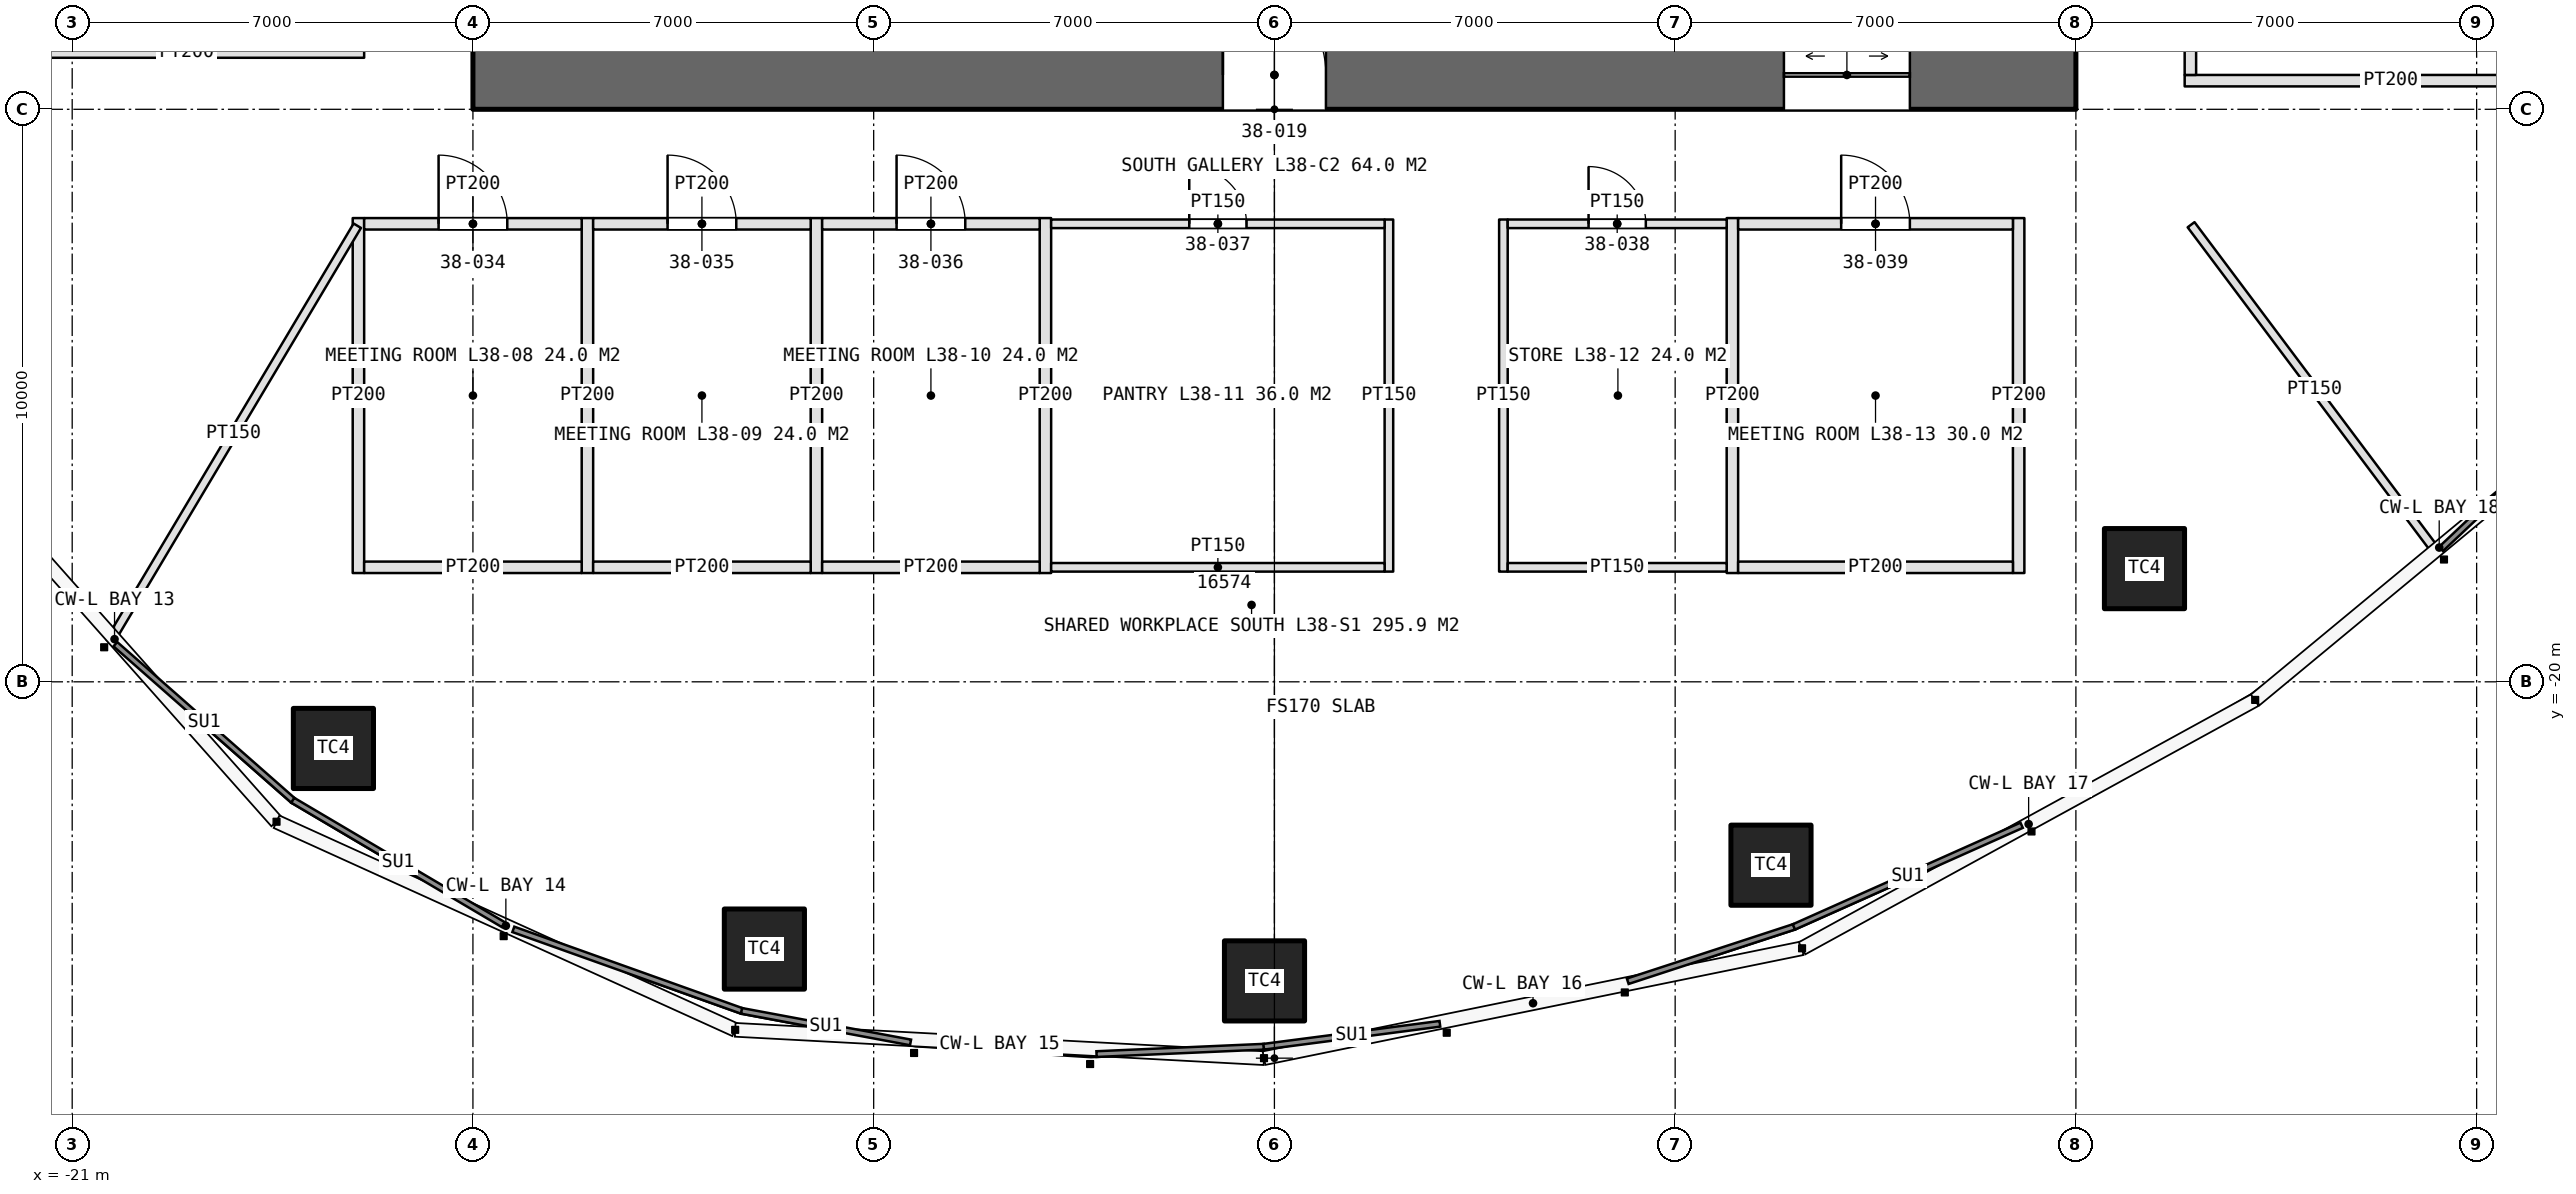
"""IFC4 building model, lengths in metres.
Left out: names, types, materials, properties, quantities, classifications, styles, units other than length and angle.
Written with IfcOpenShell. Run it as: python <this file> out.ifc"""

import sys

from ifc_helpers import new_model, si_unit, direction, frame, frame_2d, origin, origin_2d, place, context, subcontext, project, spatial, rectangle, extrude, element, fill, save


model = new_model("IFC4")
c1 = context("Model", 3, precision=1e-05, world=origin(), true_north=direction((0.0, 1.0)))
c2 = subcontext(c1, "Body", "Model", "MODEL_VIEW")
j1 = project(units=[si_unit("LENGTHUNIT", "METRE"), si_unit("PLANEANGLEUNIT", "RADIAN")], contexts=[c1])
p1 = place(None, origin())
s1 = spatial("IfcSite", under=j1, at=p1, CompositionType="ELEMENT")
p2 = place(p1, origin())
s2 = spatial("IfcBuilding", under=s1, at=p2, CompositionType="ELEMENT")
p3 = place(p2, frame((0.0, 0.0, 176.4)))
s3 = spatial("IfcBuildingStorey", under=s2, at=p3, CompositionType="ELEMENT", Elevation=176.4)
p4 = place(p3, frame((-14.0, -9.4, 0.0), z_axis=(0.0, 0.0, 1.0), x_axis=(1.0, 0.0, 0.0)))
e1 = element("IfcWall", 1, at=p4, inside=s3, PredefinedType="SHEAR", context=c2, shape_type="SweptSolid", body=[
    extrude(rectangle(XDim=28.0, YDim=1.2, at=frame_2d((14.0, 0.0))), origin(), (0.0, 0.0, 1.0), 4.2),
])
p5 = place(p4, frame((13.1, 0.0, 0.0)))
e2 = element("IfcOpeningElement", 2, at=p5, cuts=e1, PredefinedType="OPENING", context=c2, shape_type="SweptSolid", body=[
    extrude(rectangle(XDim=1.8, YDim=2.4, at=frame_2d((0.9, 1.2))), frame((0.0, 0.61, 0.0), z_axis=(0.0, -1.0, 0.0), x_axis=(1.0, 0.0, 0.0)), (0.0, 0.0, 1.0), 1.22),
])
p6 = place(p4, frame((22.9, 0.0, 0.0)))
e3 = element("IfcOpeningElement", 3, at=p6, cuts=e1, PredefinedType="OPENING", context=c2, shape_type="SweptSolid", body=[
    extrude(rectangle(XDim=2.2, YDim=2.7, at=frame_2d((1.1, 1.35))), frame((0.0, 0.61, 0.0), z_axis=(0.0, -1.0, 0.0), x_axis=(1.0, 0.0, 0.0)), (0.0, 0.0, 1.0), 1.22),
])
for number, where, z_axis, x_axis in (
    (4, (-16.437, -21.164, 0.0), (0.0, 0.0, 1.0), (1.0, 0.0, 0.0)),
    (5, (-8.909, -24.668, 0.0), (0.0, 0.0, 1.0), (1.0, 0.0, 0.0)),
    (6, (-0.173, -25.224, 0.0), (0.0, 0.0, 1.0), (1.0, 0.0, 0.0)),
    (7, (8.674, -23.203, 0.0), (0.0, 0.0, 1.0), (1.0, 0.0, 0.0)),
    (8, (15.198, -18.023, 0.0), (0.0, 0.0, 1.0), (1.0, 0.0, 0.0)),
):
    element("IfcColumn", number, at=place(p3, frame(where, z_axis=z_axis, x_axis=x_axis)), inside=s3, PredefinedType="COLUMN", context=c2, shape_type="SweptSolid", body=[
        extrude(rectangle(XDim=1.4, YDim=1.4, at=origin_2d()), origin(), (0.0, 0.0, 1.0), 4.2),
    ])
p7 = place(p3, frame((15.9, -9.5, 0.0), z_axis=(0.0, 0.0, 1.0), x_axis=(1.0, 0.0, 0.0)))
e9 = element("IfcWall", 9, at=p7, inside=s3, PredefinedType="PARTITIONING", context=c2, shape_type="SweptSolid", body=[
    extrude(rectangle(XDim=7.2, YDim=0.2, at=frame_2d((3.6, 0.0))), origin(), (0.0, 0.0, 1.0), 3.0),
])
p8 = place(p3, frame((16.0, -9.4, 0.0), z_axis=(0.0, 0.0, 1.0), x_axis=(0.0, 1.0, 0.0)))
e10 = element("IfcWall", 10, at=p8, inside=s3, PredefinedType="PARTITIONING", context=c2, shape_type="SweptSolid", body=[
    extrude(rectangle(XDim=5.8, YDim=0.2, at=frame_2d((2.9, 0.0))), origin(), (0.0, 0.0, 1.0), 3.0),
])
p9 = place(p8, frame((2.3, 0.0, 0.0)))
e11 = element("IfcOpeningElement", 11, at=p9, cuts=e10, PredefinedType="OPENING", context=c2, shape_type="SweptSolid", body=[
    extrude(rectangle(XDim=1.2, YDim=2.4, at=frame_2d((0.6, 1.2))), frame((0.0, 0.11, 0.0), z_axis=(0.0, -1.0, 0.0), x_axis=(1.0, 0.0, 0.0)), (0.0, 0.0, 1.0), 0.22),
])
for number, where, z_axis, x_axis in (
    (12, (-16.0, -11.9, 0.0), (0.0, 0.0, 1.0), (0.0, -1.0, 0.0)),
    (13, (-12.0, -11.9, 0.0), (0.0, 0.0, 1.0), (0.0, -1.0, 0.0)),
    (14, (-8.0, -11.9, 0.0), (0.0, 0.0, 1.0), (0.0, -1.0, 0.0)),
    (15, (-4.0, -11.9, 0.0), (0.0, 0.0, 1.0), (0.0, -1.0, 0.0)),
):
    element("IfcWall", number, at=place(p3, frame(where, z_axis=z_axis, x_axis=x_axis)), inside=s3, PredefinedType="PARTITIONING", context=c2, shape_type="SweptSolid", body=[
        extrude(rectangle(XDim=6.2, YDim=0.2, at=frame_2d((3.1, 0.0))), origin(), (0.0, 0.0, 1.0), 3.0),
    ])
p10 = place(p3, frame((2.0, -11.925, 0.0), z_axis=(0.0, 0.0, 1.0), x_axis=(0.0, -1.0, 0.0)))
e16 = element("IfcWall", 16, at=p10, inside=s3, PredefinedType="PARTITIONING", context=c2, shape_type="SweptSolid", body=[
    extrude(rectangle(XDim=6.15, YDim=0.15, at=frame_2d((3.075, 0.0))), origin(), (0.0, 0.0, 1.0), 3.0),
])
p11 = place(p3, frame((-15.9, -12.0, 0.0), z_axis=(0.0, 0.0, 1.0), x_axis=(1.0, 0.0, 0.0)))
e17 = element("IfcWall", 17, at=p11, inside=s3, PredefinedType="PARTITIONING", context=c2, shape_type="SweptSolid", body=[
    extrude(rectangle(XDim=3.8, YDim=0.2, at=frame_2d((1.9, 0.0))), origin(), (0.0, 0.0, 1.0), 3.0),
])
p12 = place(p11, frame((1.3, 0.0, 0.0)))
e18 = element("IfcOpeningElement", 18, at=p12, cuts=e17, PredefinedType="OPENING", context=c2, shape_type="SweptSolid", body=[
    extrude(rectangle(XDim=1.2, YDim=2.4, at=frame_2d((0.6, 1.2))), frame((0.0, 0.11, 0.0), z_axis=(0.0, -1.0, 0.0), x_axis=(1.0, 0.0, 0.0)), (0.0, 0.0, 1.0), 0.22),
])
p13 = place(p3, frame((-15.9, -18.0, 0.0), z_axis=(0.0, 0.0, 1.0), x_axis=(1.0, 0.0, 0.0)))
e19 = element("IfcWall", 19, at=p13, inside=s3, PredefinedType="PARTITIONING", context=c2, shape_type="SweptSolid", body=[
    extrude(rectangle(XDim=3.8, YDim=0.2, at=frame_2d((1.9, 0.0))), origin(), (0.0, 0.0, 1.0), 3.0),
])
p14 = place(p3, frame((-11.9, -12.0, 0.0), z_axis=(0.0, 0.0, 1.0), x_axis=(1.0, 0.0, 0.0)))
e20 = element("IfcWall", 20, at=p14, inside=s3, PredefinedType="PARTITIONING", context=c2, shape_type="SweptSolid", body=[
    extrude(rectangle(XDim=3.8, YDim=0.2, at=frame_2d((1.9, 0.0))), origin(), (0.0, 0.0, 1.0), 3.0),
])
p15 = place(p14, frame((1.3, 0.0, 0.0)))
e21 = element("IfcOpeningElement", 21, at=p15, cuts=e20, PredefinedType="OPENING", context=c2, shape_type="SweptSolid", body=[
    extrude(rectangle(XDim=1.2, YDim=2.4, at=frame_2d((0.6, 1.2))), frame((0.0, 0.11, 0.0), z_axis=(0.0, -1.0, 0.0), x_axis=(1.0, 0.0, 0.0)), (0.0, 0.0, 1.0), 0.22),
])
p16 = place(p3, frame((-11.9, -18.0, 0.0), z_axis=(0.0, 0.0, 1.0), x_axis=(1.0, 0.0, 0.0)))
e22 = element("IfcWall", 22, at=p16, inside=s3, PredefinedType="PARTITIONING", context=c2, shape_type="SweptSolid", body=[
    extrude(rectangle(XDim=3.8, YDim=0.2, at=frame_2d((1.9, 0.0))), origin(), (0.0, 0.0, 1.0), 3.0),
])
p17 = place(p3, frame((-7.9, -12.0, 0.0), z_axis=(0.0, 0.0, 1.0), x_axis=(1.0, 0.0, 0.0)))
e23 = element("IfcWall", 23, at=p17, inside=s3, PredefinedType="PARTITIONING", context=c2, shape_type="SweptSolid", body=[
    extrude(rectangle(XDim=3.8, YDim=0.2, at=frame_2d((1.9, 0.0))), origin(), (0.0, 0.0, 1.0), 3.0),
])
p18 = place(p17, frame((1.3, 0.0, 0.0)))
e24 = element("IfcOpeningElement", 24, at=p18, cuts=e23, PredefinedType="OPENING", context=c2, shape_type="SweptSolid", body=[
    extrude(rectangle(XDim=1.2, YDim=2.4, at=frame_2d((0.6, 1.2))), frame((0.0, 0.11, 0.0), z_axis=(0.0, -1.0, 0.0), x_axis=(1.0, 0.0, 0.0)), (0.0, 0.0, 1.0), 0.22),
])
p19 = place(p3, frame((-7.9, -18.0, 0.0), z_axis=(0.0, 0.0, 1.0), x_axis=(1.0, 0.0, 0.0)))
e25 = element("IfcWall", 25, at=p19, inside=s3, PredefinedType="PARTITIONING", context=c2, shape_type="SweptSolid", body=[
    extrude(rectangle(XDim=3.8, YDim=0.2, at=frame_2d((1.9, 0.0))), origin(), (0.0, 0.0, 1.0), 3.0),
])
p20 = place(p3, frame((-3.9, -12.0, 0.0), z_axis=(0.0, 0.0, 1.0), x_axis=(1.0, 0.0, 0.0)))
e26 = element("IfcWall", 26, at=p20, inside=s3, PredefinedType="PARTITIONING", context=c2, shape_type="SweptSolid", body=[
    extrude(rectangle(XDim=5.825, YDim=0.15, at=frame_2d((2.913, 0.0))), origin(), (0.0, 0.0, 1.0), 3.0),
])
p21 = place(p20, frame((2.413, 0.0, 0.0)))
e27 = element("IfcOpeningElement", 27, at=p21, cuts=e26, PredefinedType="OPENING", context=c2, shape_type="SweptSolid", body=[
    extrude(rectangle(XDim=1.0, YDim=2.2, at=frame_2d((0.5, 1.1))), frame((0.0, 0.085, 0.0), z_axis=(0.0, -1.0, 0.0), x_axis=(1.0, 0.0, 0.0)), (0.0, 0.0, 1.0), 0.17),
])
p22 = place(p3, frame((-3.9, -18.0, 0.0), z_axis=(0.0, 0.0, 1.0), x_axis=(1.0, 0.0, 0.0)))
e28 = element("IfcWall", 28, at=p22, inside=s3, PredefinedType="PARTITIONING", context=c2, shape_type="SweptSolid", body=[
    extrude(rectangle(XDim=5.825, YDim=0.15, at=frame_2d((2.913, 0.0))), origin(), (0.0, 0.0, 1.0), 3.0),
])
p23 = place(p3, frame((4.0, -11.925, 0.0), z_axis=(0.0, 0.0, 1.0), x_axis=(0.0, -1.0, 0.0)))
e29 = element("IfcWall", 29, at=p23, inside=s3, PredefinedType="PARTITIONING", context=c2, shape_type="SweptSolid", body=[
    extrude(rectangle(XDim=6.15, YDim=0.15, at=frame_2d((3.075, 0.0))), origin(), (0.0, 0.0, 1.0), 3.0),
])
for number, where, z_axis, x_axis in (
    (30, (8.0, -11.9, 0.0), (0.0, 0.0, 1.0), (0.0, -1.0, 0.0)),
    (31, (13.0, -11.9, 0.0), (0.0, 0.0, 1.0), (0.0, -1.0, 0.0)),
):
    element("IfcWall", number, at=place(p3, frame(where, z_axis=z_axis, x_axis=x_axis)), inside=s3, PredefinedType="PARTITIONING", context=c2, shape_type="SweptSolid", body=[
        extrude(rectangle(XDim=6.2, YDim=0.2, at=frame_2d((3.1, 0.0))), origin(), (0.0, 0.0, 1.0), 3.0),
    ])
p24 = place(p3, frame((4.075, -12.0, 0.0), z_axis=(0.0, 0.0, 1.0), x_axis=(1.0, 0.0, 0.0)))
e32 = element("IfcWall", 32, at=p24, inside=s3, PredefinedType="PARTITIONING", context=c2, shape_type="SweptSolid", body=[
    extrude(rectangle(XDim=3.825, YDim=0.15, at=frame_2d((1.913, 0.0))), origin(), (0.0, 0.0, 1.0), 3.0),
])
p25 = place(p24, frame((1.413, 0.0, 0.0)))
e33 = element("IfcOpeningElement", 33, at=p25, cuts=e32, PredefinedType="OPENING", context=c2, shape_type="SweptSolid", body=[
    extrude(rectangle(XDim=1.0, YDim=2.2, at=frame_2d((0.5, 1.1))), frame((0.0, 0.085, 0.0), z_axis=(0.0, -1.0, 0.0), x_axis=(1.0, 0.0, 0.0)), (0.0, 0.0, 1.0), 0.17),
])
p26 = place(p3, frame((4.075, -18.0, 0.0), z_axis=(0.0, 0.0, 1.0), x_axis=(1.0, 0.0, 0.0)))
e34 = element("IfcWall", 34, at=p26, inside=s3, PredefinedType="PARTITIONING", context=c2, shape_type="SweptSolid", body=[
    extrude(rectangle(XDim=3.825, YDim=0.15, at=frame_2d((1.913, 0.0))), origin(), (0.0, 0.0, 1.0), 3.0),
])
p27 = place(p3, frame((8.1, -12.0, 0.0), z_axis=(0.0, 0.0, 1.0), x_axis=(1.0, 0.0, 0.0)))
e35 = element("IfcWall", 35, at=p27, inside=s3, PredefinedType="PARTITIONING", context=c2, shape_type="SweptSolid", body=[
    extrude(rectangle(XDim=4.8, YDim=0.2, at=frame_2d((2.4, 0.0))), origin(), (0.0, 0.0, 1.0), 3.0),
])
p28 = place(p27, frame((1.8, 0.0, 0.0)))
e36 = element("IfcOpeningElement", 36, at=p28, cuts=e35, PredefinedType="OPENING", context=c2, shape_type="SweptSolid", body=[
    extrude(rectangle(XDim=1.2, YDim=2.4, at=frame_2d((0.6, 1.2))), frame((0.0, 0.11, 0.0), z_axis=(0.0, -1.0, 0.0), x_axis=(1.0, 0.0, 0.0)), (0.0, 0.0, 1.0), 0.22),
])
p29 = place(p3, frame((8.1, -18.0, 0.0), z_axis=(0.0, 0.0, 1.0), x_axis=(1.0, 0.0, 0.0)))
e37 = element("IfcWall", 37, at=p29, inside=s3, PredefinedType="PARTITIONING", context=c2, shape_type="SweptSolid", body=[
    extrude(rectangle(XDim=4.8, YDim=0.2, at=frame_2d((2.4, 0.0))), origin(), (0.0, 0.0, 1.0), 3.0),
])
p30 = place(p3, frame((-15.9, -9.0, 0.0), z_axis=(0.0, 0.0, 1.0), x_axis=(-1.0, 0.0, 0.0)))
e38 = element("IfcWall", 38, at=p30, inside=s3, PredefinedType="PARTITIONING", context=c2, shape_type="SweptSolid", body=[
    extrude(rectangle(XDim=6.2, YDim=0.2, at=frame_2d((3.1, 0.0))), origin(), (0.0, 0.0, 1.0), 3.0),
])
p31 = place(p3, frame((-16.02, -12.034, 0.0), z_axis=(0.0, 0.0, 1.0), x_axis=(-0.511518902153, -0.859272024879, 0.0)))
e39 = element("IfcWall", 39, at=p31, inside=s3, PredefinedType="PARTITIONING", context=c2, shape_type="SweptSolid", body=[
    extrude(rectangle(XDim=8.451, YDim=0.15, at=frame_2d((4.226, 0.0))), origin(), (0.0, 0.0, 1.0), 3.0),
])
p32 = place(p3, frame((16.012, -12.016, 0.0), z_axis=(0.0, 0.0, 1.0), x_axis=(0.600059749679, -0.799955184254, 0.0)))
e40 = element("IfcWall", 40, at=p32, inside=s3, PredefinedType="PARTITIONING", context=c2, shape_type="SweptSolid", body=[
    extrude(rectangle(XDim=7.191, YDim=0.15, at=frame_2d((3.596, 0.0))), origin(), (0.0, 0.0, 1.0), 3.0),
])
p33 = place(p5, origin())
e41 = element("IfcDoor", 41, at=p33, inside=s3, OperationType="DOUBLE_DOOR_SINGLE_SWING", PredefinedType="DOOR", context=c2, shape_type="SweptSolid", body=[
    extrude(rectangle(XDim=1.8, YDim=2.4, at=frame_2d((0.9, 1.2))), frame((0.0, 0.025, 0.0), z_axis=(0.0, -1.0, 0.0), x_axis=(1.0, 0.0, 0.0)), (0.0, 0.0, 1.0), 0.05),
])
fill(e2, e41)
p34 = place(p6, origin())
e42 = element("IfcDoor", 42, at=p34, inside=s3, OperationType="DOUBLE_DOOR_SLIDING", PredefinedType="DOOR", context=c2, shape_type="SweptSolid", body=[
    extrude(rectangle(XDim=2.2, YDim=2.7, at=frame_2d((1.1, 1.35))), frame((0.0, 0.025, 0.0), z_axis=(0.0, -1.0, 0.0), x_axis=(1.0, 0.0, 0.0)), (0.0, 0.0, 1.0), 0.05),
])
fill(e3, e42)
p35 = place(p12, origin())
e43 = element("IfcDoor", 43, at=p35, inside=s3, OperationType="SINGLE_SWING_LEFT", PredefinedType="DOOR", context=c2, shape_type="SweptSolid", body=[
    extrude(rectangle(XDim=1.2, YDim=2.4, at=frame_2d((0.6, 1.2))), frame((0.0, 0.025, 0.0), z_axis=(0.0, -1.0, 0.0), x_axis=(1.0, 0.0, 0.0)), (0.0, 0.0, 1.0), 0.05),
])
fill(e18, e43)
p36 = place(p15, origin())
e44 = element("IfcDoor", 44, at=p36, inside=s3, OperationType="SINGLE_SWING_LEFT", PredefinedType="DOOR", context=c2, shape_type="SweptSolid", body=[
    extrude(rectangle(XDim=1.2, YDim=2.4, at=frame_2d((0.6, 1.2))), frame((0.0, 0.025, 0.0), z_axis=(0.0, -1.0, 0.0), x_axis=(1.0, 0.0, 0.0)), (0.0, 0.0, 1.0), 0.05),
])
fill(e21, e44)
p37 = place(p18, origin())
e45 = element("IfcDoor", 45, at=p37, inside=s3, OperationType="SINGLE_SWING_LEFT", PredefinedType="DOOR", context=c2, shape_type="SweptSolid", body=[
    extrude(rectangle(XDim=1.2, YDim=2.4, at=frame_2d((0.6, 1.2))), frame((0.0, 0.025, 0.0), z_axis=(0.0, -1.0, 0.0), x_axis=(1.0, 0.0, 0.0)), (0.0, 0.0, 1.0), 0.05),
])
fill(e24, e45)
p38 = place(p21, origin())
e46 = element("IfcDoor", 46, at=p38, inside=s3, OperationType="SINGLE_SWING_LEFT", PredefinedType="DOOR", context=c2, shape_type="SweptSolid", body=[
    extrude(rectangle(XDim=1.0, YDim=2.2, at=frame_2d((0.5, 1.1))), frame((0.0, 0.025, 0.0), z_axis=(0.0, -1.0, 0.0), x_axis=(1.0, 0.0, 0.0)), (0.0, 0.0, 1.0), 0.05),
])
fill(e27, e46)
p39 = place(p25, origin())
e47 = element("IfcDoor", 47, at=p39, inside=s3, OperationType="SINGLE_SWING_LEFT", PredefinedType="DOOR", context=c2, shape_type="SweptSolid", body=[
    extrude(rectangle(XDim=1.0, YDim=2.2, at=frame_2d((0.5, 1.1))), frame((0.0, 0.025, 0.0), z_axis=(0.0, -1.0, 0.0), x_axis=(1.0, 0.0, 0.0)), (0.0, 0.0, 1.0), 0.05),
])
fill(e33, e47)
p40 = place(p28, origin())
e48 = element("IfcDoor", 48, at=p40, inside=s3, OperationType="SINGLE_SWING_LEFT", PredefinedType="DOOR", context=c2, shape_type="SweptSolid", body=[
    extrude(rectangle(XDim=1.2, YDim=2.4, at=frame_2d((0.6, 1.2))), frame((0.0, 0.025, 0.0), z_axis=(0.0, -1.0, 0.0), x_axis=(1.0, 0.0, 0.0)), (0.0, 0.0, 1.0), 0.05),
])
fill(e36, e48)
save(model, sys.argv[1])
